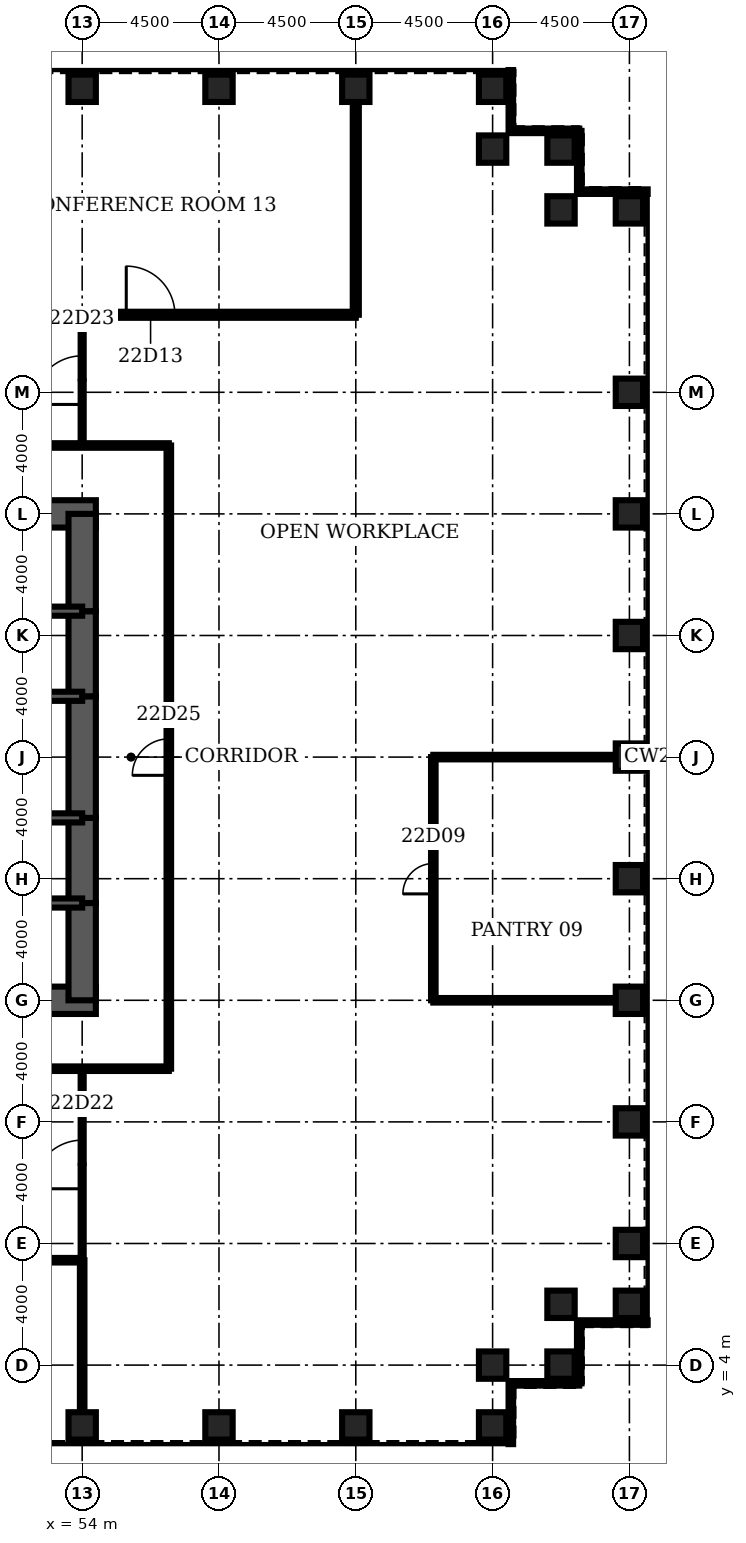
"""IFC4 building model, lengths in metres.
Left out: names, types, materials, properties, quantities, classifications, styles, units other than length and angle.
Written with IfcOpenShell. Run it as: python <this file> out.ifc"""

import sys

from ifc_helpers import new_model, si_unit, direction, frame, frame_2d, origin, origin_2d, place, context, subcontext, project, spatial, rectangle, hollow_rectangle, extrude, element, fill, save


model = new_model("IFC4")
c1 = context("Model", 3, precision=1e-05, world=origin(), true_north=direction((0.0, 1.0)))
c2 = subcontext(c1, "Body", "Model", "MODEL_VIEW")
j1 = project(units=[si_unit("LENGTHUNIT", "METRE"), si_unit("PLANEANGLEUNIT", "RADIAN")], contexts=[c1])
p1 = place(None, origin())
s1 = spatial("IfcSite", under=j1, at=p1, CompositionType="ELEMENT")
p2 = place(p1, origin())
s2 = spatial("IfcBuilding", under=s1, at=p2, CompositionType="ELEMENT")
p3 = place(p2, frame((0.0, 0.0, 104.7)))
s3 = spatial("IfcBuildingStorey", under=s2, at=p3, CompositionType="ELEMENT", Elevation=104.7)
for number, where, z_axis, x_axis in (
    (1, (54.0, 2.0, 0.0), (0.0, 0.0, 1.0), (0.0, 1.0, 0.0)),
    (2, (58.5, 2.0, 0.0), (0.0, 0.0, 1.0), (0.0, 1.0, 0.0)),
    (3, (63.0, 2.0, 0.0), (0.0, 0.0, 1.0), (0.0, 1.0, 0.0)),
    (4, (67.5, 2.0, 0.0), (0.0, 0.0, 1.0), (0.0, 1.0, 0.0)),
    (5, (67.5, 4.0, 0.0), (0.0, 0.0, 1.0), (0.0, 1.0, 0.0)),
    (6, (69.75, 4.0, 0.0), (0.0, 0.0, 1.0), (1.0, 0.0, 0.0)),
    (7, (69.75, 6.0, 0.0), (0.0, 0.0, 1.0), (1.0, 0.0, 0.0)),
    (8, (72.0, 6.0, 0.0), (0.0, 0.0, 1.0), (1.0, 0.0, 0.0)),
    (9, (72.0, 8.0, 0.0), (0.0, 0.0, 1.0), (1.0, 0.0, 0.0)),
    (10, (72.0, 12.0, 0.0), (0.0, 0.0, 1.0), (1.0, 0.0, 0.0)),
    (11, (72.0, 16.0, 0.0), (0.0, 0.0, 1.0), (1.0, 0.0, 0.0)),
    (12, (72.0, 20.0, 0.0), (0.0, 0.0, 1.0), (1.0, 0.0, 0.0)),
    (13, (72.0, 24.0, 0.0), (0.0, 0.0, 1.0), (1.0, 0.0, 0.0)),
    (14, (72.0, 28.0, 0.0), (0.0, 0.0, 1.0), (1.0, 0.0, 0.0)),
    (15, (72.0, 32.0, 0.0), (0.0, 0.0, 1.0), (1.0, 0.0, 0.0)),
    (16, (72.0, 36.0, 0.0), (0.0, 0.0, 1.0), (1.0, 0.0, 0.0)),
    (17, (72.0, 42.0, 0.0), (0.0, 0.0, 1.0), (1.0, 0.0, 0.0)),
    (18, (69.75, 42.0, 0.0), (0.0, 0.0, 1.0), (1.0, 0.0, 0.0)),
    (19, (69.75, 44.0, 0.0), (0.0, 0.0, 1.0), (1.0, 0.0, 0.0)),
    (20, (67.5, 44.0, 0.0), (0.0, 0.0, 1.0), (0.0, 1.0, 0.0)),
    (21, (67.5, 46.0, 0.0), (0.0, 0.0, 1.0), (0.0, 1.0, 0.0)),
    (22, (63.0, 46.0, 0.0), (0.0, 0.0, 1.0), (0.0, 1.0, 0.0)),
    (23, (58.5, 46.0, 0.0), (0.0, 0.0, 1.0), (0.0, 1.0, 0.0)),
    (24, (54.0, 46.0, 0.0), (0.0, 0.0, 1.0), (0.0, 1.0, 0.0)),
):
    element("IfcColumn", number, at=place(p3, frame(where, z_axis=z_axis, x_axis=x_axis)), inside=s3, PredefinedType="COLUMN", context=c2, shape_type="SweptSolid", body=[
        extrude(hollow_rectangle(XDim=0.9, YDim=0.9, WallThickness=0.11, at=origin_2d()), origin(), (0.0, 0.0, 1.0), 4.2),
    ])
for number, where, z_axis, x_axis in (
    (25, (45.0, 16.0, 0.0), (0.0, 0.0, 1.0), (1.0, 0.0, 0.0)),
    (26, (54.45, 32.0, 0.0), (0.0, 0.0, 1.0), (-1.0, 0.0, 0.0)),
):
    element("IfcWall", number, at=place(p3, frame(where, z_axis=z_axis, x_axis=x_axis)), inside=s3, PredefinedType="SHEAR", context=c2, shape_type="SweptSolid", body=[
        extrude(rectangle(XDim=9.45, YDim=0.9, at=frame_2d((4.725, 0.0))), origin(), (0.0, 0.0, 1.0), 4.2),
    ])
p4 = place(p3, frame((54.0, 16.0, 0.0), z_axis=(0.0, 0.0, 1.0), x_axis=(0.0, 1.0, 0.0)))
e27 = element("IfcWall", 27, at=p4, inside=s3, PredefinedType="SHEAR", context=c2, shape_type="SweptSolid", body=[
    extrude(rectangle(XDim=3.2, YDim=0.9, at=frame_2d((1.6, 0.0))), origin(), (0.0, 0.0, 1.0), 4.2),
])
p5 = place(p3, frame((54.0, 19.2, 0.0), z_axis=(0.0, 0.0, 1.0), x_axis=(0.0, 1.0, 0.0)))
e28 = element("IfcWall", 28, at=p5, inside=s3, PredefinedType="SHEAR", context=c2, shape_type="SweptSolid", body=[
    extrude(rectangle(XDim=2.8, YDim=0.9, at=frame_2d((1.4, 0.0))), origin(), (0.0, 0.0, 1.0), 4.2),
])
p6 = place(p5, frame((0.4, 0.0, 0.0)))
e29 = element("IfcOpeningElement", 29, at=p6, cuts=e28, PredefinedType="OPENING", context=c2, shape_type="SweptSolid", body=[
    extrude(rectangle(XDim=1.8, YDim=2.1, at=frame_2d((0.9, 1.05))), frame((0.0, 0.46, 0.0), z_axis=(0.0, -1.0, 0.0), x_axis=(1.0, 0.0, 0.0)), (0.0, 0.0, 1.0), 0.92),
])
p7 = place(p3, frame((54.0, 22.0, 0.0), z_axis=(0.0, 0.0, 1.0), x_axis=(0.0, 1.0, 0.0)))
e30 = element("IfcWall", 30, at=p7, inside=s3, PredefinedType="SHEAR", context=c2, shape_type="SweptSolid", body=[
    extrude(rectangle(XDim=4.0, YDim=0.9, at=frame_2d((2.0, 0.0))), origin(), (0.0, 0.0, 1.0), 4.2),
])
p8 = place(p3, frame((54.0, 26.0, 0.0), z_axis=(0.0, 0.0, 1.0), x_axis=(0.0, 1.0, 0.0)))
e31 = element("IfcWall", 31, at=p8, inside=s3, PredefinedType="SHEAR", context=c2, shape_type="SweptSolid", body=[
    extrude(rectangle(XDim=2.8, YDim=0.9, at=frame_2d((1.4, 0.0))), origin(), (0.0, 0.0, 1.0), 4.2),
])
p9 = place(p8, frame((0.6, 0.0, 0.0)))
e32 = element("IfcOpeningElement", 32, at=p9, cuts=e31, PredefinedType="OPENING", context=c2, shape_type="SweptSolid", body=[
    extrude(rectangle(XDim=1.8, YDim=2.1, at=frame_2d((0.9, 1.05))), frame((0.0, 0.46, 0.0), z_axis=(0.0, -1.0, 0.0), x_axis=(1.0, 0.0, 0.0)), (0.0, 0.0, 1.0), 0.92),
])
p10 = place(p3, frame((54.0, 28.8, 0.0), z_axis=(0.0, 0.0, 1.0), x_axis=(0.0, 1.0, 0.0)))
e33 = element("IfcWall", 33, at=p10, inside=s3, PredefinedType="SHEAR", context=c2, shape_type="SweptSolid", body=[
    extrude(rectangle(XDim=3.2, YDim=0.9, at=frame_2d((1.6, 0.0))), origin(), (0.0, 0.0, 1.0), 4.2),
])
p11 = place(p3, frame((45.0, 19.2, 0.0), z_axis=(0.0, 0.0, 1.0), x_axis=(1.0, 0.0, 0.0)))
e34 = element("IfcWall", 34, at=p11, inside=s3, PredefinedType="SOLIDWALL", context=c2, shape_type="SweptSolid", body=[
    extrude(rectangle(XDim=9.0, YDim=0.3, at=frame_2d((4.5, 0.0))), origin(), (0.0, 0.0, 1.0), 4.2),
])
p12 = place(p11, frame((7.35, 0.0, 0.0)))
e35 = element("IfcOpeningElement", 35, at=p12, cuts=e34, PredefinedType="OPENING", context=c2, shape_type="SweptSolid", body=[
    extrude(rectangle(XDim=1.0, YDim=2.1, at=frame_2d((0.5, 1.05))), frame((0.0, 0.16, 0.0), z_axis=(0.0, -1.0, 0.0), x_axis=(1.0, 0.0, 0.0)), (0.0, 0.0, 1.0), 0.32),
])
p13 = place(p3, frame((45.0, 28.8, 0.0), z_axis=(0.0, 0.0, 1.0), x_axis=(1.0, 0.0, 0.0)))
e36 = element("IfcWall", 36, at=p13, inside=s3, PredefinedType="SOLIDWALL", context=c2, shape_type="SweptSolid", body=[
    extrude(rectangle(XDim=9.0, YDim=0.3, at=frame_2d((4.5, 0.0))), origin(), (0.0, 0.0, 1.0), 4.2),
])
p14 = place(p13, frame((7.35, 0.0, 0.0)))
e37 = element("IfcOpeningElement", 37, at=p14, cuts=e36, PredefinedType="OPENING", context=c2, shape_type="SweptSolid", body=[
    extrude(rectangle(XDim=1.0, YDim=2.1, at=frame_2d((0.5, 1.05))), frame((0.0, 0.16, 0.0), z_axis=(0.0, -1.0, 0.0), x_axis=(1.0, 0.0, 0.0)), (0.0, 0.0, 1.0), 0.32),
])
p15 = place(p3, frame((48.0, 22.0, 0.0), z_axis=(0.0, 0.0, 1.0), x_axis=(1.0, 0.0, 0.0)))
e38 = element("IfcWall", 38, at=p15, inside=s3, PredefinedType="SOLIDWALL", context=c2, shape_type="SweptSolid", body=[
    extrude(rectangle(XDim=6.0, YDim=0.3, at=frame_2d((3.0, 0.0))), origin(), (0.0, 0.0, 1.0), 4.2),
])
p16 = place(p15, frame((2.0, 0.0, 0.0)))
e39 = element("IfcOpeningElement", 39, at=p16, cuts=e38, PredefinedType="OPENING", context=c2, shape_type="SweptSolid", body=[
    extrude(rectangle(XDim=1.0, YDim=2.1, at=frame_2d((0.5, 1.05))), frame((0.0, 0.16, 0.0), z_axis=(0.0, -1.0, 0.0), x_axis=(1.0, 0.0, 0.0)), (0.0, 0.0, 1.0), 0.32),
])
p17 = place(p15, frame((4.3, 0.0, 0.0)))
e40 = element("IfcOpeningElement", 40, at=p17, cuts=e38, PredefinedType="OPENING", context=c2, shape_type="SweptSolid", body=[
    extrude(rectangle(XDim=1.0, YDim=2.1, at=frame_2d((0.5, 1.05))), frame((0.0, 0.16, 0.0), z_axis=(0.0, -1.0, 0.0), x_axis=(1.0, 0.0, 0.0)), (0.0, 0.0, 1.0), 0.32),
])
p18 = place(p3, frame((48.0, 26.0, 0.0), z_axis=(0.0, 0.0, 1.0), x_axis=(1.0, 0.0, 0.0)))
e41 = element("IfcWall", 41, at=p18, inside=s3, PredefinedType="SOLIDWALL", context=c2, shape_type="SweptSolid", body=[
    extrude(rectangle(XDim=6.0, YDim=0.3, at=frame_2d((3.0, 0.0))), origin(), (0.0, 0.0, 1.0), 4.2),
])
p19 = place(p3, frame((45.0, 7.45, 0.0), z_axis=(0.0, 0.0, 1.0), x_axis=(1.0, 0.0, 0.0)))
e42 = element("IfcWall", 42, at=p19, inside=s3, PredefinedType="PARTITIONING", context=c2, shape_type="SweptSolid", body=[
    extrude(rectangle(XDim=9.0, YDim=0.15, at=frame_2d((4.5, 0.0))), origin(), (0.0, 0.0, 1.0), 3.0),
])
p20 = place(p19, frame((4.0, 0.0, 0.0)))
e43 = element("IfcOpeningElement", 43, at=p20, cuts=e42, PredefinedType="OPENING", context=c2, shape_type="SweptSolid", body=[
    extrude(rectangle(XDim=1.0, YDim=2.1, at=frame_2d((0.5, 1.05))), frame((0.0, 0.085, 0.0), z_axis=(0.0, -1.0, 0.0), x_axis=(1.0, 0.0, 0.0)), (0.0, 0.0, 1.0), 0.17),
])
p21 = place(p3, frame((35.0, 13.75, 0.0), z_axis=(0.0, 0.0, 1.0), x_axis=(1.0, 0.0, 0.0)))
e44 = element("IfcWall", 44, at=p21, inside=s3, PredefinedType="PARTITIONING", context=c2, shape_type="SweptSolid", body=[
    extrude(rectangle(XDim=21.85, YDim=0.15, at=frame_2d((10.925, 0.0))), origin(), (0.0, 0.0, 1.0), 3.0),
])
p22 = place(p21, frame((8.925, 0.0, 0.0)))
e45 = element("IfcOpeningElement", 45, at=p22, cuts=e44, PredefinedType="OPENING", context=c2, shape_type="SweptSolid", body=[
    extrude(rectangle(XDim=1.2, YDim=2.1, at=frame_2d((0.6, 1.05))), frame((0.0, 0.085, 0.0), z_axis=(0.0, -1.0, 0.0), x_axis=(1.0, 0.0, 0.0)), (0.0, 0.0, 1.0), 0.17),
])
for number, where, z_axis, x_axis in (
    (46, (65.55, 16.0, 0.0), (0.0, 0.0, 1.0), (1.0, 0.0, 0.0)),
    (47, (65.55, 24.0, 0.0), (0.0, 0.0, 1.0), (1.0, 0.0, 0.0)),
):
    element("IfcWall", number, at=place(p3, frame(where, z_axis=z_axis, x_axis=x_axis)), inside=s3, PredefinedType="PARTITIONING", context=c2, shape_type="SweptSolid", body=[
        extrude(rectangle(XDim=6.0, YDim=0.15, at=frame_2d((3.0, 0.0))), origin(), (0.0, 0.0, 1.0), 3.0),
    ])
p23 = place(p3, frame((15.15, 34.25, 0.0), z_axis=(0.0, 0.0, 1.0), x_axis=(1.0, 0.0, 0.0)))
e48 = element("IfcWall", 48, at=p23, inside=s3, PredefinedType="PARTITIONING", context=c2, shape_type="SweptSolid", body=[
    extrude(rectangle(XDim=41.7, YDim=0.15, at=frame_2d((20.85, 0.0))), origin(), (0.0, 0.0, 1.0), 3.0),
])
p24 = place(p23, frame((20.25, 0.0, 0.0)))
e49 = element("IfcOpeningElement", 49, at=p24, cuts=e48, PredefinedType="OPENING", context=c2, shape_type="SweptSolid", body=[
    extrude(rectangle(XDim=1.2, YDim=2.1, at=frame_2d((0.6, 1.05))), frame((0.0, 0.085, 0.0), z_axis=(0.0, -1.0, 0.0), x_axis=(1.0, 0.0, 0.0)), (0.0, 0.0, 1.0), 0.17),
])
p25 = place(p3, frame((49.5, 38.55, 0.0), z_axis=(0.0, 0.0, 1.0), x_axis=(1.0, 0.0, 0.0)))
e50 = element("IfcWall", 50, at=p25, inside=s3, PredefinedType="PARTITIONING", context=c2, shape_type="SweptSolid", body=[
    extrude(rectangle(XDim=13.5, YDim=0.2, at=frame_2d((6.75, 0.0))), origin(), (0.0, 0.0, 1.0), 3.0),
])
p26 = place(p25, frame((5.95, 0.0, 0.0)))
e51 = element("IfcOpeningElement", 51, at=p26, cuts=e50, PredefinedType="OPENING", context=c2, shape_type="SweptSolid", body=[
    extrude(rectangle(XDim=1.6, YDim=2.1, at=frame_2d((0.8, 1.05))), frame((0.0, 0.11, 0.0), z_axis=(0.0, -1.0, 0.0), x_axis=(1.0, 0.0, 0.0)), (0.0, 0.0, 1.0), 0.22),
])
p27 = place(p3, frame((54.0, 2.45, 0.0), z_axis=(0.0, 0.0, 1.0), x_axis=(0.0, 1.0, 0.0)))
e52 = element("IfcWall", 52, at=p27, inside=s3, PredefinedType="PARTITIONING", context=c2, shape_type="SweptSolid", body=[
    extrude(rectangle(XDim=5.0, YDim=0.15, at=frame_2d((2.5, 0.0))), origin(), (0.0, 0.0, 1.0), 3.0),
])
p28 = place(p3, frame((54.0, 7.45, 0.0), z_axis=(0.0, 0.0, 1.0), x_axis=(0.0, 1.0, 0.0)))
e53 = element("IfcWall", 53, at=p28, inside=s3, PredefinedType="PARTITIONING", context=c2, shape_type="SweptSolid", body=[
    extrude(rectangle(XDim=6.3, YDim=0.1, at=frame_2d((3.15, 0.0))), origin(), (0.0, 0.0, 1.0), 3.0),
])
p29 = place(p28, frame((2.35, 0.0, 0.0)))
e54 = element("IfcOpeningElement", 54, at=p29, cuts=e53, PredefinedType="OPENING", context=c2, shape_type="SweptSolid", body=[
    extrude(rectangle(XDim=1.6, YDim=2.1, at=frame_2d((0.8, 1.05))), frame((0.0, 0.06, 0.0), z_axis=(0.0, -1.0, 0.0), x_axis=(1.0, 0.0, 0.0)), (0.0, 0.0, 1.0), 0.12),
])
p30 = place(p3, frame((54.0, 34.25, 0.0), z_axis=(0.0, 0.0, 1.0), x_axis=(0.0, 1.0, 0.0)))
e55 = element("IfcWall", 55, at=p30, inside=s3, PredefinedType="PARTITIONING", context=c2, shape_type="SweptSolid", body=[
    extrude(rectangle(XDim=4.3, YDim=0.1, at=frame_2d((2.15, 0.0))), origin(), (0.0, 0.0, 1.0), 3.0),
])
p31 = place(p30, frame((1.35, 0.0, 0.0)))
e56 = element("IfcOpeningElement", 56, at=p31, cuts=e55, PredefinedType="OPENING", context=c2, shape_type="SweptSolid", body=[
    extrude(rectangle(XDim=1.6, YDim=2.1, at=frame_2d((0.8, 1.05))), frame((0.0, 0.06, 0.0), z_axis=(0.0, -1.0, 0.0), x_axis=(1.0, 0.0, 0.0)), (0.0, 0.0, 1.0), 0.12),
])
p32 = place(p3, frame((56.85, 13.75, 0.0), z_axis=(0.0, 0.0, 1.0), x_axis=(0.0, 1.0, 0.0)))
e57 = element("IfcWall", 57, at=p32, inside=s3, PredefinedType="PARTITIONING", context=c2, shape_type="SweptSolid", body=[
    extrude(rectangle(XDim=20.5, YDim=0.15, at=frame_2d((10.25, 0.0))), origin(), (0.0, 0.0, 1.0), 3.0),
])
p33 = place(p32, frame((9.65, 0.0, 0.0)))
e58 = element("IfcOpeningElement", 58, at=p33, cuts=e57, PredefinedType="OPENING", context=c2, shape_type="SweptSolid", body=[
    extrude(rectangle(XDim=1.2, YDim=2.1, at=frame_2d((0.6, 1.05))), frame((0.0, 0.085, 0.0), z_axis=(0.0, -1.0, 0.0), x_axis=(1.0, 0.0, 0.0)), (0.0, 0.0, 1.0), 0.17),
])
p34 = place(p3, frame((63.0, 38.55, 0.0), z_axis=(0.0, 0.0, 1.0), x_axis=(0.0, 1.0, 0.0)))
e59 = element("IfcWall", 59, at=p34, inside=s3, PredefinedType="PARTITIONING", context=c2, shape_type="SweptSolid", body=[
    extrude(rectangle(XDim=7.0, YDim=0.2, at=frame_2d((3.5, 0.0))), origin(), (0.0, 0.0, 1.0), 3.0),
])
p35 = place(p3, frame((65.55, 16.0, 0.0), z_axis=(0.0, 0.0, 1.0), x_axis=(0.0, 1.0, 0.0)))
e60 = element("IfcWall", 60, at=p35, inside=s3, PredefinedType="PARTITIONING", context=c2, shape_type="SweptSolid", body=[
    extrude(rectangle(XDim=8.0, YDim=0.15, at=frame_2d((4.0, 0.0))), origin(), (0.0, 0.0, 1.0), 3.0),
])
p36 = place(p35, frame((3.5, 0.0, 0.0)))
e61 = element("IfcOpeningElement", 61, at=p36, cuts=e60, PredefinedType="OPENING", context=c2, shape_type="SweptSolid", body=[
    extrude(rectangle(XDim=1.0, YDim=2.1, at=frame_2d((0.5, 1.05))), frame((0.0, 0.085, 0.0), z_axis=(0.0, -1.0, 0.0), x_axis=(1.0, 0.0, 0.0)), (0.0, 0.0, 1.0), 0.17),
])
p37 = place(p3, frame((68.1, 1.4, 0.0), z_axis=(0.0, 0.0, 1.0), x_axis=(0.0, 1.0, 0.0)))
e62 = element("IfcWall", 62, at=p37, inside=s3, PredefinedType="ELEMENTEDWALL", context=c2, shape_type="SweptSolid", body=[
    extrude(rectangle(XDim=2.0, YDim=0.15, at=frame_2d((1.0, 0.0))), origin(), (0.0, 0.0, 1.0), 4.04),
])
p38 = place(p3, frame((68.1, 3.4, 0.0), z_axis=(0.0, 0.0, 1.0), x_axis=(1.0, 0.0, 0.0)))
e63 = element("IfcWall", 63, at=p38, inside=s3, PredefinedType="ELEMENTEDWALL", context=c2, shape_type="SweptSolid", body=[
    extrude(rectangle(XDim=2.25, YDim=0.15, at=frame_2d((1.125, 0.0))), origin(), (0.0, 0.0, 1.0), 4.04),
])
p39 = place(p3, frame((70.35, 3.4, 0.0), z_axis=(0.0, 0.0, 1.0), x_axis=(0.0, 1.0, 0.0)))
e64 = element("IfcWall", 64, at=p39, inside=s3, PredefinedType="ELEMENTEDWALL", context=c2, shape_type="SweptSolid", body=[
    extrude(rectangle(XDim=2.0, YDim=0.15, at=frame_2d((1.0, 0.0))), origin(), (0.0, 0.0, 1.0), 4.04),
])
for number, where, z_axis, x_axis in (
    (65, (70.35, 5.4, 0.0), (0.0, 0.0, 1.0), (1.0, 0.0, 0.0)),
    (66, (72.6, 42.6, 0.0), (0.0, 0.0, 1.0), (-1.0, 0.0, 0.0)),
):
    element("IfcWall", number, at=place(p3, frame(where, z_axis=z_axis, x_axis=x_axis)), inside=s3, PredefinedType="ELEMENTEDWALL", context=c2, shape_type="SweptSolid", body=[
        extrude(rectangle(XDim=2.25, YDim=0.15, at=frame_2d((1.125, 0.0))), origin(), (0.0, 0.0, 1.0), 4.04),
    ])
p40 = place(p3, frame((70.35, 42.6, 0.0), z_axis=(0.0, 0.0, 1.0), x_axis=(0.0, 1.0, 0.0)))
e67 = element("IfcWall", 67, at=p40, inside=s3, PredefinedType="ELEMENTEDWALL", context=c2, shape_type="SweptSolid", body=[
    extrude(rectangle(XDim=2.0, YDim=0.15, at=frame_2d((1.0, 0.0))), origin(), (0.0, 0.0, 1.0), 4.04),
])
p41 = place(p3, frame((70.35, 44.6, 0.0), z_axis=(0.0, 0.0, 1.0), x_axis=(-1.0, 0.0, 0.0)))
e68 = element("IfcWall", 68, at=p41, inside=s3, PredefinedType="ELEMENTEDWALL", context=c2, shape_type="SweptSolid", body=[
    extrude(rectangle(XDim=2.25, YDim=0.15, at=frame_2d((1.125, 0.0))), origin(), (0.0, 0.0, 1.0), 4.04),
])
p42 = place(p3, frame((68.1, 44.6, 0.0), z_axis=(0.0, 0.0, 1.0), x_axis=(0.0, 1.0, 0.0)))
e69 = element("IfcWall", 69, at=p42, inside=s3, PredefinedType="ELEMENTEDWALL", context=c2, shape_type="SweptSolid", body=[
    extrude(rectangle(XDim=2.0, YDim=0.15, at=frame_2d((1.0, 0.0))), origin(), (0.0, 0.0, 1.0), 4.04),
])
p43 = place(p36, origin())
e70 = element("IfcDoor", 70, at=p43, inside=s3, OperationType="SINGLE_SWING_LEFT", PredefinedType="DOOR", context=c2, shape_type="SweptSolid", body=[
    extrude(rectangle(XDim=1.0, YDim=2.1, at=frame_2d((0.5, 1.05))), frame((0.0, 0.025, 0.0), z_axis=(0.0, -1.0, 0.0), x_axis=(1.0, 0.0, 0.0)), (0.0, 0.0, 1.0), 0.05),
])
fill(e61, e70)
p44 = place(p26, origin())
e71 = element("IfcDoor", 71, at=p44, inside=s3, OperationType="SINGLE_SWING_LEFT", PredefinedType="DOOR", context=c2, shape_type="SweptSolid", body=[
    extrude(rectangle(XDim=1.6, YDim=2.1, at=frame_2d((0.8, 1.05))), frame((0.0, 0.025, 0.0), z_axis=(0.0, -1.0, 0.0), x_axis=(1.0, 0.0, 0.0)), (0.0, 0.0, 1.0), 0.05),
])
fill(e51, e71)
p45 = place(p29, origin())
e72 = element("IfcDoor", 72, at=p45, inside=s3, OperationType="SINGLE_SWING_LEFT", PredefinedType="DOOR", context=c2, shape_type="SweptSolid", body=[
    extrude(rectangle(XDim=1.6, YDim=2.1, at=frame_2d((0.8, 1.05))), frame((0.0, 0.025, 0.0), z_axis=(0.0, -1.0, 0.0), x_axis=(1.0, 0.0, 0.0)), (0.0, 0.0, 1.0), 0.05),
])
fill(e54, e72)
p46 = place(p31, origin())
e73 = element("IfcDoor", 73, at=p46, inside=s3, OperationType="SINGLE_SWING_LEFT", PredefinedType="DOOR", context=c2, shape_type="SweptSolid", body=[
    extrude(rectangle(XDim=1.6, YDim=2.1, at=frame_2d((0.8, 1.05))), frame((0.0, 0.025, 0.0), z_axis=(0.0, -1.0, 0.0), x_axis=(1.0, 0.0, 0.0)), (0.0, 0.0, 1.0), 0.05),
])
fill(e56, e73)
p47 = place(p33, origin())
e74 = element("IfcDoor", 74, at=p47, inside=s3, OperationType="SINGLE_SWING_LEFT", PredefinedType="DOOR", context=c2, shape_type="SweptSolid", body=[
    extrude(rectangle(XDim=1.2, YDim=2.1, at=frame_2d((0.6, 1.05))), frame((0.0, 0.025, 0.0), z_axis=(0.0, -1.0, 0.0), x_axis=(1.0, 0.0, 0.0)), (0.0, 0.0, 1.0), 0.05),
])
fill(e58, e74)
p48 = place(p12, origin())
e75 = element("IfcDoor", 75, at=p48, inside=s3, OperationType="SINGLE_SWING_RIGHT", PredefinedType="DOOR", context=c2, shape_type="SweptSolid", body=[
    extrude(rectangle(XDim=1.0, YDim=2.1, at=frame_2d((0.5, 1.05))), frame((0.0, 0.025, 0.0), z_axis=(0.0, -1.0, 0.0), x_axis=(1.0, 0.0, 0.0)), (0.0, 0.0, 1.0), 0.05),
])
fill(e35, e75)
p49 = place(p14, origin())
e76 = element("IfcDoor", 76, at=p49, inside=s3, OperationType="SINGLE_SWING_RIGHT", PredefinedType="DOOR", context=c2, shape_type="SweptSolid", body=[
    extrude(rectangle(XDim=1.0, YDim=2.1, at=frame_2d((0.5, 1.05))), frame((0.0, 0.025, 0.0), z_axis=(0.0, -1.0, 0.0), x_axis=(1.0, 0.0, 0.0)), (0.0, 0.0, 1.0), 0.05),
])
fill(e37, e76)
p50 = place(p6, origin())
e77 = element("IfcDoor", 77, at=p50, inside=s3, OperationType="SINGLE_SWING_LEFT", PredefinedType="DOOR", context=c2, shape_type="SweptSolid", body=[
    extrude(rectangle(XDim=1.8, YDim=2.1, at=frame_2d((0.9, 1.05))), frame((0.0, 0.45, 0.0), z_axis=(0.0, -1.0, 0.0), x_axis=(1.0, 0.0, 0.0)), (0.0, 0.0, 1.0), 0.899),
])
fill(e29, e77)
p51 = place(p9, origin())
e78 = element("IfcDoor", 78, at=p51, inside=s3, OperationType="SINGLE_SWING_LEFT", PredefinedType="DOOR", context=c2, shape_type="SweptSolid", body=[
    extrude(rectangle(XDim=1.8, YDim=2.1, at=frame_2d((0.9, 1.05))), frame((0.0, 0.45, 0.0), z_axis=(0.0, -1.0, 0.0), x_axis=(1.0, 0.0, 0.0)), (0.0, 0.0, 1.0), 0.899),
])
fill(e32, e78)
p52 = place(p17, origin())
e79 = element("IfcDoor", 79, at=p52, inside=s3, OperationType="SINGLE_SWING_RIGHT", PredefinedType="DOOR", context=c2, shape_type="SweptSolid", body=[
    extrude(rectangle(XDim=1.0, YDim=2.1, at=frame_2d((0.5, 1.05))), frame((0.0, 0.025, 0.0), z_axis=(0.0, -1.0, 0.0), x_axis=(1.0, 0.0, 0.0)), (0.0, 0.0, 1.0), 0.05),
])
fill(e40, e79)
save(model, sys.argv[1])
